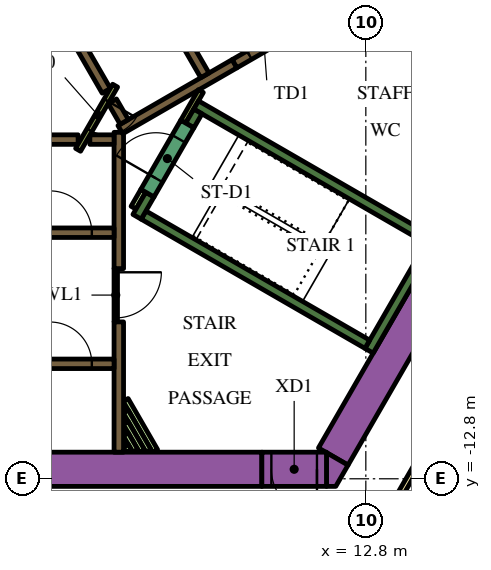
"""IFC4 building model, lengths in metres.
Left out: names, types, materials, properties, quantities, classifications, styles, units other than length and angle.
Written with IfcOpenShell. Run it as: python <this file> out.ifc"""

import sys

from ifc_helpers import new_model, si_unit, direction, frame, frame_2d, origin, place, context, subcontext, project, spatial, polyline, rectangle, outline, extrude, element, fill, save


model = new_model("IFC4")
c1 = context("Model", 3, precision=1e-05, world=origin(), true_north=direction((0.0, 1.0)))
c2 = subcontext(c1, "Body", "Model", "MODEL_VIEW")
j1 = project(units=[si_unit("LENGTHUNIT", "METRE"), si_unit("PLANEANGLEUNIT", "RADIAN")], contexts=[c1])
p1 = place(None, origin())
s1 = spatial("IfcSite", under=j1, at=p1, CompositionType="ELEMENT")
p2 = place(p1, origin())
s2 = spatial("IfcBuilding", under=s1, at=p2, CompositionType="ELEMENT")
p3 = place(p2, frame((0.0, 0.0, 51.0)))
s3 = spatial("IfcBuildingStorey", under=s2, at=p3, CompositionType="ELEMENT", Elevation=51.0)
p4 = place(p3, frame((6.776, 13.364, 0.0), z_axis=(0.0, 0.0, 1.0), x_axis=(0.500004177138, -0.8660229921, 0.0)))
e1 = element("IfcWall", 1, at=p4, inside=s3, PredefinedType="SOLIDWALL", context=c2, shape_type="SweptSolid", body=[
    extrude(rectangle(XDim=20.204, YDim=0.9, at=frame_2d((10.102, 0.0))), origin(), (0.0, 0.0, 1.0), 3.9),
])
p5 = place(p3, frame((11.943, -12.214, 0.0), z_axis=(0.0, 0.0, 1.0), x_axis=(0.49998092645, 0.866036415623, 0.0)))
e2 = element("IfcWall", 2, at=p5, inside=s3, PredefinedType="SOLIDWALL", context=c2, shape_type="SweptSolid", body=[
    extrude(rectangle(XDim=8.83, YDim=0.9, at=frame_2d((4.415, 0.0))), origin(), (0.0, 0.0, 1.0), 3.9),
])
p6 = place(p3, origin())
e3 = element("IfcWall", 3, at=p6, inside=s3, PredefinedType="SOLIDWALL", context=c2, shape_type="SweptSolid", body=[
    extrude(outline(polyline([(12.009, -13.0), (11.764, -13.0), (11.764, -12.113), (12.332, -12.441), (12.009, -13.0)])), origin(), (0.0, 0.0, 1.0), 3.9),
])
p7 = place(p3, frame((-12.019, -12.55, 0.0), z_axis=(0.0, 0.0, 1.0), x_axis=(1.0, 0.0, 0.0)))
e4 = element("IfcWall", 4, at=p7, inside=s3, PredefinedType="SOLIDWALL", context=c2, shape_type="SweptSolid", body=[
    extrude(rectangle(XDim=22.083, YDim=0.9, at=frame_2d((11.042, 0.0))), origin(), (0.0, 0.0, 1.0), 3.9),
])
p8 = place(p3, frame((12.885, -9.431, 0.0), z_axis=(0.0, 0.0, 1.0), x_axis=(0.500020560727, 0.866013532718, 0.0)))
e5 = element("IfcWall", 5, at=p8, inside=s3, PredefinedType="SOLIDWALL", context=c2, shape_type="SweptSolid", body=[
    extrude(rectangle(XDim=3.45, YDim=0.25, at=frame_2d((1.725, 0.0))), origin(), (0.0, 0.0, 1.0), 3.9),
])
p9 = place(p3, frame((12.84, -9.261, 0.0), z_axis=(0.0, 0.0, 1.0), x_axis=(-0.866013990052, 0.500019768644, 0.0)))
e6 = element("IfcWall", 6, at=p9, inside=s3, PredefinedType="SOLIDWALL", context=c2, shape_type="SweptSolid", body=[
    extrude(rectangle(XDim=6.8, YDim=0.25, at=frame_2d((3.4, 0.0))), origin(), (0.0, 0.0, 1.0), 3.9),
])
p10 = place(p3, frame((6.78, -5.906, 0.0), z_axis=(0.0, 0.0, 1.0), x_axis=(0.500223362819, 0.865896406789, 0.0)))
e7 = element("IfcWall", 7, at=p10, inside=s3, PredefinedType="SOLIDWALL", context=c2, shape_type="SweptSolid", body=[
    extrude(rectangle(XDim=0.675, YDim=0.25, at=frame_2d((0.337, 0.0))), origin(), (0.0, 0.0, 1.0), 3.9),
])
p11 = place(p3, frame((8.334, -2.964, 0.0), z_axis=(0.0, 0.0, 1.0), x_axis=(0.866016039709, -0.500016218704, 0.0)))
e8 = element("IfcWall", 8, at=p11, inside=s3, PredefinedType="SOLIDWALL", context=c2, shape_type="SweptSolid", body=[
    extrude(rectangle(XDim=7.05, YDim=0.25, at=frame_2d((3.525, 0.0))), origin(), (0.0, 0.0, 1.0), 3.9),
])
p12 = place(p3, frame((8.168, -3.503, 0.0), z_axis=(0.0, 0.0, 1.0), x_axis=(0.49972245349, 0.866185586049, 0.0)))
e9 = element("IfcWall", 9, at=p12, inside=s3, PredefinedType="SOLIDWALL", context=c2, shape_type="SweptSolid", body=[
    extrude(rectangle(XDim=0.425, YDim=0.25, at=frame_2d((0.212, 0.0))), origin(), (0.0, 0.0, 1.0), 3.9),
])
p13 = place(p3, frame((-5.259, -3.875, 0.0), z_axis=(0.0, 0.0, 1.0), x_axis=(1.0, 0.0, 0.0)))
e10 = element("IfcWall", 10, at=p13, inside=s3, PredefinedType="SOLIDWALL", context=c2, shape_type="SweptSolid", body=[
    extrude(rectangle(XDim=10.489, YDim=0.25, at=frame_2d((5.244, 0.0))), origin(), (0.0, 0.0, 1.0), 3.9),
])
p14 = place(p3, frame((6.3, -7.27, 0.0), z_axis=(0.0, 0.0, 1.0), x_axis=(0.0, 1.0, 0.0)))
e11 = element("IfcWall", 11, at=p14, inside=s3, PredefinedType="SOLIDWALL", context=c2, shape_type="SweptSolid", body=[
    extrude(rectangle(XDim=3.586, YDim=0.25, at=frame_2d((1.793, 0.0))), origin(), (0.0, 0.0, 1.0), 3.9),
])
p15 = place(p3, frame((6.3, -12.1, 0.0), z_axis=(0.0, 0.0, 1.0), x_axis=(0.0, 1.0, 0.0)))
e12 = element("IfcWall", 12, at=p15, inside=s3, PredefinedType="SOLIDWALL", context=c2, shape_type="SweptSolid", body=[
    extrude(rectangle(XDim=3.428, YDim=0.25, at=frame_2d((1.714, 0.0))), origin(), (0.0, 0.0, 1.0), 3.9),
])
p16 = place(p3, frame((5.538, -3.875, 0.0), z_axis=(0.0, 0.0, 1.0), x_axis=(1.0, 0.0, 0.0)))
e13 = element("IfcWall", 13, at=p16, inside=s3, PredefinedType="SOLIDWALL", context=c2, shape_type="SweptSolid", body=[
    extrude(rectangle(XDim=0.637, YDim=0.25, at=frame_2d((0.318, 0.0))), origin(), (0.0, 0.0, 1.0), 3.9),
])
p17 = place(p3, frame((9.346, -1.879, 0.0), z_axis=(0.0, 0.0, 1.0), x_axis=(-0.866048528039, -0.499959945477, 0.0)))
e14 = element("IfcWall", 14, at=p17, inside=s3, PredefinedType="SOLIDWALL", context=c2, shape_type="SweptSolid", body=[
    extrude(rectangle(XDim=3.47, YDim=0.25, at=frame_2d((1.735, 0.0))), origin(), (0.0, 0.0, 1.0), 3.9),
])
p18 = place(p3, frame((6.13, -2.867, 0.0), z_axis=(0.0, 0.0, 1.0), x_axis=(0.500160776593, -0.865932559475, 0.0)))
e15 = element("IfcWall", 15, at=p18, inside=s3, PredefinedType="SOLIDWALL", context=c2, shape_type="SweptSolid", body=[
    extrude(rectangle(XDim=0.627, YDim=0.25, at=frame_2d((0.313, 0.0))), origin(), (0.0, 0.0, 1.0), 3.9),
])
p19 = place(p3, frame((5.97, -2.591, 0.0), z_axis=(0.0, 0.0, 1.0), x_axis=(-0.499994469932, 0.866028596547, 0.0)))
e16 = element("IfcWall", 16, at=p19, inside=s3, PredefinedType="SOLIDWALL", context=c2, shape_type="SweptSolid", body=[
    extrude(rectangle(XDim=10.488, YDim=0.25, at=frame_2d((5.244, 0.0))), origin(), (0.0, 0.0, 1.0), 3.9),
])
p20 = place(p3, frame((6.48, -10.726, 0.0), z_axis=(0.0, 0.0, 1.0), x_axis=(0.500017819788, -0.86601511528, 0.0)))
e17 = element("IfcWall", 17, at=p20, inside=s3, PredefinedType="PARTITIONING", context=c2, shape_type="SweptSolid", body=[
    extrude(rectangle(XDim=1.55, YDim=0.15, at=frame_2d((0.775, 0.0))), origin(), (0.0, 0.0, 1.0), 2.75),
])
p21 = place(p3, frame((6.48, -11.026, 0.0), z_axis=(0.0, 0.0, 1.0), x_axis=(0.49995654735, -0.86605048973, 0.0)))
e18 = element("IfcWall", 18, at=p21, inside=s3, PredefinedType="PARTITIONING", context=c2, shape_type="SweptSolid", body=[
    extrude(rectangle(XDim=1.204, YDim=0.15, at=frame_2d((0.602, 0.0))), origin(), (0.0, 0.0, 1.0), 2.75),
])
p22 = place(p3, frame((6.48, -11.326, 0.0), z_axis=(0.0, 0.0, 1.0), x_axis=(0.500059337743, -0.865991142412, 0.0)))
e19 = element("IfcWall", 19, at=p22, inside=s3, PredefinedType="PARTITIONING", context=c2, shape_type="SweptSolid", body=[
    extrude(rectangle(XDim=0.857, YDim=0.15, at=frame_2d((0.429, 0.0))), origin(), (0.0, 0.0, 1.0), 2.75),
])
p23 = place(p3, frame((6.48, -11.626, 0.0), z_axis=(0.0, 0.0, 1.0), x_axis=(0.500301480982, -0.865851273677, 0.0)))
e20 = element("IfcWall", 20, at=p23, inside=s3, PredefinedType="PARTITIONING", context=c2, shape_type="SweptSolid", body=[
    extrude(rectangle(XDim=0.511, YDim=0.15, at=frame_2d((0.255, 0.0))), origin(), (0.0, 0.0, 1.0), 2.75),
])
p24 = place(p3, frame((6.48, -11.926, 0.0), z_axis=(0.0, 0.0, 1.0), x_axis=(0.500450775723, -0.86576499183, 0.0)))
e21 = element("IfcWall", 21, at=p24, inside=s3, PredefinedType="PARTITIONING", context=c2, shape_type="SweptSolid", body=[
    extrude(rectangle(XDim=0.164, YDim=0.15, at=frame_2d((0.082, 0.0))), origin(), (0.0, 0.0, 1.0), 2.75),
])
p25 = place(p3, frame((6.945, -5.222, 0.0), z_axis=(0.0, 0.0, 1.0), x_axis=(-0.499818422106, -0.866130212453, 0.0)))
e22 = element("IfcWall", 22, at=p25, inside=s3, PredefinedType="PARTITIONING", context=c2, shape_type="SweptSolid", body=[
    extrude(rectangle(XDim=0.514, YDim=0.15, at=frame_2d((0.257, 0.0))), origin(), (0.0, 0.0, 1.0), 2.75),
])
p26 = place(p3, frame((8.459, -2.599, 0.0), z_axis=(0.0, 0.0, 1.0), x_axis=(-0.500041054325, -0.866001699761, 0.0)))
e23 = element("IfcWall", 23, at=p26, inside=s3, PredefinedType="PARTITIONING", context=c2, shape_type="SweptSolid", body=[
    extrude(rectangle(XDim=0.929, YDim=0.15, at=frame_2d((0.464, 0.0))), origin(), (0.0, 0.0, 1.0), 3.9),
])
p27 = place(p3, frame((-6.175, -9.775, 0.0), z_axis=(0.0, 0.0, 1.0), x_axis=(1.0, 0.0, 0.0)))
e24 = element("IfcWall", 24, at=p27, inside=s3, PredefinedType="SOLIDWALL", context=c2, shape_type="SweptSolid", body=[
    extrude(rectangle(XDim=12.35, YDim=0.25, at=frame_2d((6.175, 0.0))), origin(), (0.0, 0.0, 1.0), 3.9),
])
p28 = place(p27, frame((0.585, 0.0, 0.0)))
e25 = element("IfcOpeningElement", 25, at=p28, cuts=e24, PredefinedType="OPENING", context=c2, shape_type="SweptSolid", body=[
    extrude(rectangle(XDim=1.1, YDim=2.1, at=frame_2d((0.55, 1.05))), frame((0.0, 0.135, 0.0), z_axis=(0.0, -1.0, 0.0), x_axis=(1.0, 0.0, 0.0)), (0.0, 0.0, 1.0), 0.27),
])
p29 = place(p27, frame((3.105, 0.0, 0.0)))
e26 = element("IfcOpeningElement", 26, at=p29, cuts=e24, PredefinedType="OPENING", context=c2, shape_type="SweptSolid", body=[
    extrude(rectangle(XDim=1.1, YDim=2.1, at=frame_2d((0.55, 1.05))), frame((0.0, 0.135, 0.0), z_axis=(0.0, -1.0, 0.0), x_axis=(1.0, 0.0, 0.0)), (0.0, 0.0, 1.0), 0.27),
])
p30 = place(p27, frame((5.625, 0.0, 0.0)))
e27 = element("IfcOpeningElement", 27, at=p30, cuts=e24, PredefinedType="OPENING", context=c2, shape_type="SweptSolid", body=[
    extrude(rectangle(XDim=1.1, YDim=2.1, at=frame_2d((0.55, 1.05))), frame((0.0, 0.135, 0.0), z_axis=(0.0, -1.0, 0.0), x_axis=(1.0, 0.0, 0.0)), (0.0, 0.0, 1.0), 0.27),
])
p31 = place(p27, frame((8.145, 0.0, 0.0)))
e28 = element("IfcOpeningElement", 28, at=p31, cuts=e24, PredefinedType="OPENING", context=c2, shape_type="SweptSolid", body=[
    extrude(rectangle(XDim=1.1, YDim=2.1, at=frame_2d((0.55, 1.05))), frame((0.0, 0.135, 0.0), z_axis=(0.0, -1.0, 0.0), x_axis=(1.0, 0.0, 0.0)), (0.0, 0.0, 1.0), 0.27),
])
p32 = place(p27, frame((10.665, 0.0, 0.0)))
e29 = element("IfcOpeningElement", 29, at=p32, cuts=e24, PredefinedType="OPENING", context=c2, shape_type="SweptSolid", body=[
    extrude(rectangle(XDim=1.1, YDim=2.1, at=frame_2d((0.55, 1.05))), frame((0.0, 0.135, 0.0), z_axis=(0.0, -1.0, 0.0), x_axis=(1.0, 0.0, 0.0)), (0.0, 0.0, 1.0), 0.27),
])
p33 = place(p3, frame((-6.175, -6.325, 0.0), z_axis=(0.0, 0.0, 1.0), x_axis=(1.0, 0.0, 0.0)))
e30 = element("IfcWall", 30, at=p33, inside=s3, PredefinedType="SOLIDWALL", context=c2, shape_type="SweptSolid", body=[
    extrude(rectangle(XDim=12.35, YDim=0.25, at=frame_2d((6.175, 0.0))), origin(), (0.0, 0.0, 1.0), 3.9),
])
p34 = place(p33, frame((3.205, 0.0, 0.0)))
e31 = element("IfcOpeningElement", 31, at=p34, cuts=e30, PredefinedType="OPENING", context=c2, shape_type="SweptSolid", body=[
    extrude(rectangle(XDim=0.9, YDim=2.1, at=frame_2d((0.45, 1.05))), frame((0.0, 0.135, 0.0), z_axis=(0.0, -1.0, 0.0), x_axis=(1.0, 0.0, 0.0)), (0.0, 0.0, 1.0), 0.27),
])
p35 = place(p33, frame((8.145, 0.0, 0.0)))
e32 = element("IfcOpeningElement", 32, at=p35, cuts=e30, PredefinedType="OPENING", context=c2, shape_type="SweptSolid", body=[
    extrude(rectangle(XDim=1.1, YDim=2.1, at=frame_2d((0.55, 1.05))), frame((0.0, 0.135, 0.0), z_axis=(0.0, -1.0, 0.0), x_axis=(1.0, 0.0, 0.0)), (0.0, 0.0, 1.0), 0.27),
])
p36 = place(p33, frame((10.665, 0.0, 0.0)))
e33 = element("IfcOpeningElement", 33, at=p36, cuts=e30, PredefinedType="OPENING", context=c2, shape_type="SweptSolid", body=[
    extrude(rectangle(XDim=1.1, YDim=2.1, at=frame_2d((0.55, 1.05))), frame((0.0, 0.135, 0.0), z_axis=(0.0, -1.0, 0.0), x_axis=(1.0, 0.0, 0.0)), (0.0, 0.0, 1.0), 0.27),
])
p37 = place(p3, frame((8.565, -2.185, 0.0), z_axis=(0.0, 0.0, 1.0), x_axis=(-0.499997954832, 0.866026584559, 0.0)))
e34 = element("IfcWall", 34, at=p37, inside=s3, PredefinedType="SOLIDWALL", context=c2, shape_type="SweptSolid", body=[
    extrude(rectangle(XDim=12.35, YDim=0.25, at=frame_2d((6.175, 0.0))), origin(), (0.0, 0.0, 1.0), 3.9),
])
p38 = place(p37, frame((5.725, 0.0, 0.0)))
e35 = element("IfcOpeningElement", 35, at=p38, cuts=e34, PredefinedType="OPENING", context=c2, shape_type="SweptSolid", body=[
    extrude(rectangle(XDim=0.9, YDim=2.1, at=frame_2d((0.45, 1.05))), frame((0.0, 0.135, 0.0), z_axis=(0.0, -1.0, 0.0), x_axis=(1.0, 0.0, 0.0)), (0.0, 0.0, 1.0), 0.27),
])
p39 = place(p3, frame((7.053, -5.284, 0.0), z_axis=(0.0, 0.0, 1.0), x_axis=(0.500078061341, 0.865980330357, 0.0)))
e36 = element("IfcWall", 36, at=p39, inside=s3, PredefinedType="SOLIDWALL", context=c2, shape_type="SweptSolid", body=[
    extrude(rectangle(XDim=2.1, YDim=0.4, at=frame_2d((1.05, 0.0))), origin(), (0.0, 0.0, 1.0), 3.9),
])
p40 = place(p39, frame((0.45, 0.0, 0.0)))
e37 = element("IfcOpeningElement", 37, at=p40, cuts=e36, PredefinedType="OPENING", context=c2, shape_type="SweptSolid", body=[
    extrude(rectangle(XDim=1.2, YDim=2.1, at=frame_2d((0.6, 1.05))), frame((0.0, 0.21, 0.0), z_axis=(0.0, -1.0, 0.0), x_axis=(1.0, 0.0, 0.0)), (0.0, 0.0, 1.0), 0.42),
])
p41 = place(p3, frame((9.346, -1.879, 0.0), z_axis=(0.0, 0.0, 1.0), x_axis=(0.866047807691, 0.499961193289, 0.0)))
e38 = element("IfcWall", 38, at=p41, inside=s3, PredefinedType="SOLIDWALL", context=c2, shape_type="SweptSolid", body=[
    extrude(rectangle(XDim=1.8, YDim=0.25, at=frame_2d((0.9, 0.0))), origin(), (0.0, 0.0, 1.0), 3.9),
])
p42 = place(p41, frame((0.45, 0.0, 0.0)))
e39 = element("IfcOpeningElement", 39, at=p42, cuts=e38, PredefinedType="OPENING", context=c2, shape_type="SweptSolid", body=[
    extrude(rectangle(XDim=0.9, YDim=2.1, at=frame_2d((0.45, 1.05))), frame((0.0, 0.135, 0.0), z_axis=(0.0, -1.0, 0.0), x_axis=(1.0, 0.0, 0.0)), (0.0, 0.0, 1.0), 0.27),
])
p43 = place(p3, frame((6.203, -2.456, 0.0), z_axis=(0.0, 0.0, 1.0), x_axis=(-0.500043961785, -0.866000020948, 0.0)))
e40 = element("IfcWall", 40, at=p43, inside=s3, PredefinedType="PARTITIONING", context=c2, shape_type="SweptSolid", body=[
    extrude(rectangle(XDim=1.95, YDim=0.15, at=frame_2d((0.975, 0.0))), origin(), (0.0, 0.0, 1.0), 3.9),
])
p44 = place(p43, frame((0.45, 0.0, 0.0)))
e41 = element("IfcOpeningElement", 41, at=p44, cuts=e40, PredefinedType="OPENING", context=c2, shape_type="SweptSolid", body=[
    extrude(rectangle(XDim=0.9, YDim=2.1, at=frame_2d((0.45, 1.05))), frame((0.0, 0.085, 0.0), z_axis=(0.0, -1.0, 0.0), x_axis=(1.0, 0.0, 0.0)), (0.0, 0.0, 1.0), 0.17),
])
p45 = place(p3, frame((6.22, -7.266, 0.0), z_axis=(0.0, 0.0, 1.0), x_axis=(0.0, -1.0, 0.0)))
e42 = element("IfcWall", 42, at=p45, inside=s3, PredefinedType="PARTITIONING", context=c2, shape_type="SweptSolid", body=[
    extrude(rectangle(XDim=1.4, YDim=0.09, at=frame_2d((0.7, 0.0))), origin(), (0.0, 0.0, 1.0), 2.75),
])
p46 = place(p45, frame((0.1, 0.0, 0.0)))
e43 = element("IfcOpeningElement", 43, at=p46, cuts=e42, PredefinedType="OPENING", context=c2, shape_type="SweptSolid", body=[
    extrude(rectangle(XDim=1.2, YDim=2.1, at=frame_2d((0.6, 1.05))), frame((0.0, 0.055, 0.0), z_axis=(0.0, -1.0, 0.0), x_axis=(1.0, 0.0, 0.0)), (0.0, 0.0, 1.0), 0.11),
])
p47 = place(p3, frame((11.764, -12.55, 0.0), z_axis=(0.0, 0.0, 1.0), x_axis=(-1.0, 0.0, 0.0)))
e44 = element("IfcWall", 44, at=p47, inside=s3, PredefinedType="SOLIDWALL", context=c2, shape_type="SweptSolid", body=[
    extrude(rectangle(XDim=1.7, YDim=0.9, at=frame_2d((0.85, 0.0))), origin(), (0.0, 0.0, 1.0), 3.9),
])
p48 = place(p47, frame((0.25, 0.0, 0.0)))
e45 = element("IfcOpeningElement", 45, at=p48, cuts=e44, PredefinedType="OPENING", context=c2, shape_type="SweptSolid", body=[
    extrude(rectangle(XDim=1.2, YDim=2.1, at=frame_2d((0.6, 1.05))), frame((0.0, 0.46, 0.0), z_axis=(0.0, -1.0, 0.0), x_axis=(1.0, 0.0, 0.0)), (0.0, 0.0, 1.0), 0.92),
])
p49 = place(p3, frame((6.163, 18.475, 0.0), z_axis=(0.0, 0.0, 1.0), x_axis=(0.500001317485, -0.866024643133, 0.0)))
e46 = element("IfcWall", 46, at=p49, inside=s3, PredefinedType="PARTITIONING", context=c2, shape_type="SweptSolid", body=[
    extrude(rectangle(XDim=25.767, YDim=0.15, at=frame_2d((12.883, 0.0))), origin(), (0.0, 0.0, 1.0), 2.75),
])
p50 = place(p49, frame((24.586, 0.0, 0.0)))
e47 = element("IfcOpeningElement", 47, at=p50, cuts=e46, PredefinedType="OPENING", context=c2, shape_type="SweptSolid", body=[
    extrude(rectangle(XDim=1.0, YDim=2.1, at=frame_2d((0.5, 1.05))), frame((0.0, 0.085, 0.0), z_axis=(0.0, -1.0, 0.0), x_axis=(1.0, 0.0, 0.0)), (0.0, 0.0, 1.0), 0.17),
])
p51 = place(p49, frame((13.144, 0.0, 0.0)))
e48 = element("IfcOpeningElement", 48, at=p51, cuts=e46, PredefinedType="OPENING", context=c2, shape_type="SweptSolid", body=[
    extrude(rectangle(XDim=1.0, YDim=2.1, at=frame_2d((0.5, 1.05))), frame((0.0, 0.085, 0.0), z_axis=(0.0, -1.0, 0.0), x_axis=(1.0, 0.0, 0.0)), (0.0, 0.0, 1.0), 0.17),
])
p52 = place(p49, frame((11.692, 0.0, 0.0)))
e49 = element("IfcOpeningElement", 49, at=p52, cuts=e46, PredefinedType="OPENING", context=c2, shape_type="SweptSolid", body=[
    extrude(rectangle(XDim=1.0, YDim=2.1, at=frame_2d((0.5, 1.05))), frame((0.0, 0.085, 0.0), z_axis=(0.0, -1.0, 0.0), x_axis=(1.0, 0.0, 0.0)), (0.0, 0.0, 1.0), 0.17),
])
p53 = place(p49, frame((0.572, 0.0, 0.0)))
e50 = element("IfcOpeningElement", 50, at=p53, cuts=e46, PredefinedType="OPENING", context=c2, shape_type="SweptSolid", body=[
    extrude(rectangle(XDim=1.0, YDim=2.1, at=frame_2d((0.5, 1.05))), frame((0.0, 0.085, 0.0), z_axis=(0.0, -1.0, 0.0), x_axis=(1.0, 0.0, 0.0)), (0.0, 0.0, 1.0), 0.17),
])
p54 = place(p3, frame((15.587, -9.952, 0.0), z_axis=(0.0, 0.0, 1.0), x_axis=(-0.500016618951, -0.866015808616, 0.0)))
e51 = element("IfcWall", 51, at=p54, inside=s3, PredefinedType="PARTITIONING", context=c2, shape_type="SweptSolid", body=[
    extrude(rectangle(XDim=5.268, YDim=0.15, at=frame_2d((2.634, 0.0))), origin(), (0.0, 0.0, 1.0), 2.75),
])
p55 = place(p32, origin())
e52 = element("IfcDoor", 52, at=p55, inside=s3, OperationType="DOUBLE_DOOR_SLIDING", PredefinedType="DOOR", context=c2, shape_type="SweptSolid", body=[
    extrude(rectangle(XDim=1.1, YDim=2.1, at=frame_2d((0.55, 1.05))), frame((0.0, 0.025, 0.0), z_axis=(0.0, -1.0, 0.0), x_axis=(1.0, 0.0, 0.0)), (0.0, 0.0, 1.0), 0.05),
])
fill(e29, e52)
p56 = place(p36, origin())
e53 = element("IfcDoor", 53, at=p56, inside=s3, OperationType="DOUBLE_DOOR_SLIDING", PredefinedType="DOOR", context=c2, shape_type="SweptSolid", body=[
    extrude(rectangle(XDim=1.1, YDim=2.1, at=frame_2d((0.55, 1.05))), frame((0.0, 0.025, 0.0), z_axis=(0.0, -1.0, 0.0), x_axis=(1.0, 0.0, 0.0)), (0.0, 0.0, 1.0), 0.05),
])
fill(e33, e53)
p57 = place(p40, origin())
e54 = element("IfcDoor", 54, at=p57, inside=s3, OperationType="SINGLE_SWING_LEFT", PredefinedType="DOOR", context=c2, shape_type="SweptSolid", body=[
    extrude(rectangle(XDim=1.2, YDim=2.1, at=frame_2d((0.6, 1.05))), frame((0.0, 0.025, 0.0), z_axis=(0.0, -1.0, 0.0), x_axis=(1.0, 0.0, 0.0)), (0.0, 0.0, 1.0), 0.05),
])
fill(e37, e54)
p58 = place(p42, origin())
e55 = element("IfcDoor", 55, at=p58, inside=s3, OperationType="SINGLE_SWING_LEFT", PredefinedType="DOOR", context=c2, shape_type="SweptSolid", body=[
    extrude(rectangle(XDim=0.9, YDim=2.1, at=frame_2d((0.45, 1.05))), frame((0.0, 0.025, 0.0), z_axis=(0.0, -1.0, 0.0), x_axis=(1.0, 0.0, 0.0)), (0.0, 0.0, 1.0), 0.05),
])
fill(e39, e55)
p59 = place(p44, origin())
e56 = element("IfcDoor", 56, at=p59, inside=s3, OperationType="SINGLE_SWING_LEFT", PredefinedType="DOOR", context=c2, shape_type="SweptSolid", body=[
    extrude(rectangle(XDim=0.9, YDim=2.1, at=frame_2d((0.45, 1.05))), frame((0.0, 0.025, 0.0), z_axis=(0.0, -1.0, 0.0), x_axis=(1.0, 0.0, 0.0)), (0.0, 0.0, 1.0), 0.05),
])
fill(e41, e56)
p60 = place(p46, origin())
e57 = element("IfcDoor", 57, at=p60, inside=s3, OperationType="SINGLE_SWING_LEFT", PredefinedType="DOOR", context=c2, shape_type="SweptSolid", body=[
    extrude(rectangle(XDim=1.2, YDim=2.1, at=frame_2d((0.6, 1.05))), frame((0.0, 0.025, 0.0), z_axis=(0.0, -1.0, 0.0), x_axis=(1.0, 0.0, 0.0)), (0.0, 0.0, 1.0), 0.05),
])
fill(e43, e57)
p61 = place(p48, origin())
e58 = element("IfcDoor", 58, at=p61, inside=s3, OperationType="SINGLE_SWING_LEFT", PredefinedType="DOOR", context=c2, shape_type="SweptSolid", body=[
    extrude(rectangle(XDim=1.2, YDim=2.1, at=frame_2d((0.6, 1.05))), frame((0.0, 0.025, 0.0), z_axis=(0.0, -1.0, 0.0), x_axis=(1.0, 0.0, 0.0)), (0.0, 0.0, 1.0), 0.05),
])
fill(e45, e58)
save(model, sys.argv[1])
